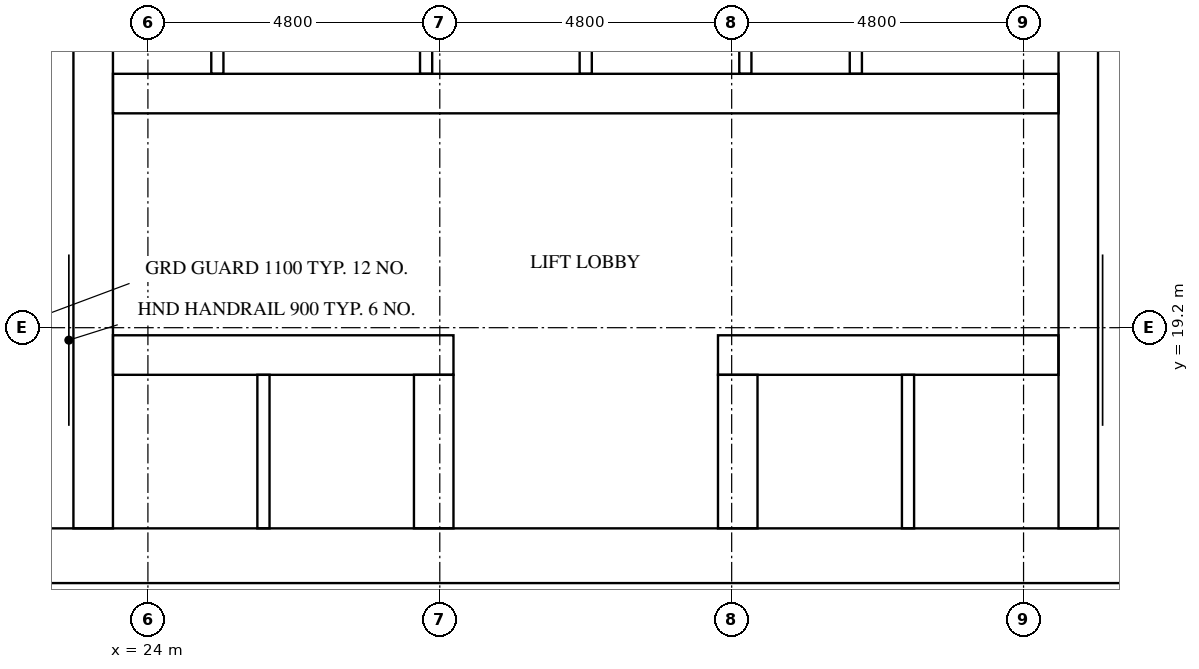
"""IFC4 building model, lengths in metres.
Left out: names, types, materials, properties, quantities, classifications, styles, units other than length and angle.
Written with IfcOpenShell. Run it as: python <this file> out.ifc"""

import sys

from ifc_helpers import new_model, si_unit, direction, frame, frame_2d, origin, place, context, subcontext, project, spatial, rectangle, extrude, element, fill, save


model = new_model("IFC4")
c1 = context("Model", 3, precision=1e-05, world=origin(), true_north=direction((0.0, 1.0)))
c2 = subcontext(c1, "Body", "Model", "MODEL_VIEW")
j1 = project(units=[si_unit("LENGTHUNIT", "METRE"), si_unit("PLANEANGLEUNIT", "RADIAN")], contexts=[c1])
p1 = place(None, origin())
s1 = spatial("IfcSite", under=j1, at=p1, CompositionType="ELEMENT")
p2 = place(p1, origin())
s2 = spatial("IfcBuilding", under=s1, at=p2, CompositionType="ELEMENT")
p3 = place(p2, frame((0.0, 0.0, 89.2)))
s3 = spatial("IfcBuildingStorey", under=s2, at=p3, CompositionType="ELEMENT", Elevation=89.2)
p4 = place(p3, frame((15.0, 15.45, 0.0), z_axis=(0.0, 0.0, 1.0), x_axis=(1.0, 0.0, 0.0)))
e1 = element("IfcWall", 1, at=p4, inside=s3, PredefinedType="SHEAR", context=c2, shape_type="SweptSolid", body=[
    extrude(rectangle(XDim=32.4, YDim=0.9, at=frame_2d((16.2, 0.0))), origin(), (0.0, 0.0, 1.0), 3.2),
])
p5 = place(p4, frame((15.3, 0.0, 0.0)))
e2 = element("IfcOpeningElement", 2, at=p5, cuts=e1, PredefinedType="OPENING", context=c2, shape_type="SweptSolid", body=[
    extrude(rectangle(XDim=1.8, YDim=2.1, at=frame_2d((0.9, 1.05))), frame((0.0, 0.46, 0.0), z_axis=(0.0, -1.0, 0.0), x_axis=(1.0, 0.0, 0.0)), (0.0, 0.0, 1.0), 0.92),
])
p6 = place(p3, frame((23.1, 15.9, 0.0), z_axis=(0.0, 0.0, 1.0), x_axis=(0.0, 1.0, 0.0)))
e3 = element("IfcWall", 3, at=p6, inside=s3, PredefinedType="SHEAR", context=c2, shape_type="SweptSolid", body=[
    extrude(rectangle(XDim=21.0, YDim=0.65, at=frame_2d((10.5, 0.0))), origin(), (0.0, 0.0, 1.0), 3.2),
])
p7 = place(p3, frame((39.3, 15.9, 0.0), z_axis=(0.0, 0.0, 1.0), x_axis=(0.0, 1.0, 0.0)))
e4 = element("IfcWall", 4, at=p7, inside=s3, PredefinedType="SHEAR", context=c2, shape_type="SweptSolid", body=[
    extrude(rectangle(XDim=8.35, YDim=0.65, at=frame_2d((4.175, 0.0))), origin(), (0.0, 0.0, 1.0), 3.2),
])
p8 = place(p3, frame((23.425, 18.75, 0.0), z_axis=(0.0, 0.0, 1.0), x_axis=(1.0, 0.0, 0.0)))
e5 = element("IfcWall", 5, at=p8, inside=s3, PredefinedType="SHEAR", context=c2, shape_type="SweptSolid", body=[
    extrude(rectangle(XDim=5.6, YDim=0.65, at=frame_2d((2.8, 0.0))), origin(), (0.0, 0.0, 1.0), 3.2),
])
p9 = place(p8, frame((0.637, 0.0, 0.0)))
e6 = element("IfcOpeningElement", 6, at=p9, cuts=e5, PredefinedType="OPENING", context=c2, shape_type="SweptSolid", body=[
    extrude(rectangle(XDim=1.1, YDim=2.1, at=frame_2d((0.55, 1.05))), frame((0.0, 0.335, 0.0), z_axis=(0.0, -1.0, 0.0), x_axis=(1.0, 0.0, 0.0)), (0.0, 0.0, 1.0), 0.67),
])
p10 = place(p8, frame((3.212, 0.0, 0.0)))
e7 = element("IfcOpeningElement", 7, at=p10, cuts=e5, PredefinedType="OPENING", context=c2, shape_type="SweptSolid", body=[
    extrude(rectangle(XDim=1.1, YDim=2.1, at=frame_2d((0.55, 1.05))), frame((0.0, 0.335, 0.0), z_axis=(0.0, -1.0, 0.0), x_axis=(1.0, 0.0, 0.0)), (0.0, 0.0, 1.0), 0.67),
])
p11 = place(p3, frame((33.375, 18.75, 0.0), z_axis=(0.0, 0.0, 1.0), x_axis=(1.0, 0.0, 0.0)))
e8 = element("IfcWall", 8, at=p11, inside=s3, PredefinedType="SHEAR", context=c2, shape_type="SweptSolid", body=[
    extrude(rectangle(XDim=5.6, YDim=0.65, at=frame_2d((2.8, 0.0))), origin(), (0.0, 0.0, 1.0), 3.2),
])
p12 = place(p11, frame((1.288, 0.0, 0.0)))
e9 = element("IfcOpeningElement", 9, at=p12, cuts=e8, PredefinedType="OPENING", context=c2, shape_type="SweptSolid", body=[
    extrude(rectangle(XDim=1.1, YDim=2.1, at=frame_2d((0.55, 1.05))), frame((0.0, 0.335, 0.0), z_axis=(0.0, -1.0, 0.0), x_axis=(1.0, 0.0, 0.0)), (0.0, 0.0, 1.0), 0.67),
])
p13 = place(p11, frame((3.863, 0.0, 0.0)))
e10 = element("IfcOpeningElement", 10, at=p13, cuts=e8, PredefinedType="OPENING", context=c2, shape_type="SweptSolid", body=[
    extrude(rectangle(XDim=1.1, YDim=2.1, at=frame_2d((0.55, 1.05))), frame((0.0, 0.335, 0.0), z_axis=(0.0, -1.0, 0.0), x_axis=(1.0, 0.0, 0.0)), (0.0, 0.0, 1.0), 0.67),
])
p14 = place(p3, frame((23.425, 23.05, 0.0), z_axis=(0.0, 0.0, 1.0), x_axis=(1.0, 0.0, 0.0)))
e11 = element("IfcWall", 11, at=p14, inside=s3, PredefinedType="SHEAR", context=c2, shape_type="SweptSolid", body=[
    extrude(rectangle(XDim=15.55, YDim=0.65, at=frame_2d((7.775, 0.0))), origin(), (0.0, 0.0, 1.0), 3.2),
])
p15 = place(p14, frame((0.309, 0.0, 0.0)))
e12 = element("IfcOpeningElement", 12, at=p15, cuts=e11, PredefinedType="OPENING", context=c2, shape_type="SweptSolid", body=[
    extrude(rectangle(XDim=1.0, YDim=2.1, at=frame_2d((0.5, 1.05))), frame((0.0, 0.335, 0.0), z_axis=(0.0, -1.0, 0.0), x_axis=(1.0, 0.0, 0.0)), (0.0, 0.0, 1.0), 0.67),
])
p16 = place(p14, frame((2.934, 0.0, 0.0)))
e13 = element("IfcOpeningElement", 13, at=p16, cuts=e11, PredefinedType="OPENING", context=c2, shape_type="SweptSolid", body=[
    extrude(rectangle(XDim=1.0, YDim=2.1, at=frame_2d((0.5, 1.05))), frame((0.0, 0.335, 0.0), z_axis=(0.0, -1.0, 0.0), x_axis=(1.0, 0.0, 0.0)), (0.0, 0.0, 1.0), 0.67),
])
p17 = place(p14, frame((10.809, 0.0, 0.0)))
e14 = element("IfcOpeningElement", 14, at=p17, cuts=e11, PredefinedType="OPENING", context=c2, shape_type="SweptSolid", body=[
    extrude(rectangle(XDim=1.0, YDim=2.1, at=frame_2d((0.5, 1.05))), frame((0.0, 0.335, 0.0), z_axis=(0.0, -1.0, 0.0), x_axis=(1.0, 0.0, 0.0)), (0.0, 0.0, 1.0), 0.67),
])
p18 = place(p14, frame((13.434, 0.0, 0.0)))
e15 = element("IfcOpeningElement", 15, at=p18, cuts=e11, PredefinedType="OPENING", context=c2, shape_type="SweptSolid", body=[
    extrude(rectangle(XDim=1.0, YDim=2.1, at=frame_2d((0.5, 1.05))), frame((0.0, 0.335, 0.0), z_axis=(0.0, -1.0, 0.0), x_axis=(1.0, 0.0, 0.0)), (0.0, 0.0, 1.0), 0.67),
])
for number, where, z_axis, x_axis in (
    (16, (28.7, 15.9, 0.0), (0.0, 0.0, 1.0), (0.0, 1.0, 0.0)),
    (17, (33.7, 15.9, 0.0), (0.0, 0.0, 1.0), (0.0, 1.0, 0.0)),
):
    element("IfcWall", number, at=place(p3, frame(where, z_axis=z_axis, x_axis=x_axis)), inside=s3, PredefinedType="SHEAR", context=c2, shape_type="SweptSolid", body=[
        extrude(rectangle(XDim=2.525, YDim=0.65, at=frame_2d((1.263, 0.0))), origin(), (0.0, 0.0, 1.0), 3.2),
    ])
for number, where, z_axis, x_axis in (
    (18, (28.575, 23.375, 0.0), (0.0, 0.0, 1.0), (0.0, 1.0, 0.0)),
    (19, (31.2, 23.375, 0.0), (0.0, 0.0, 1.0), (0.0, 1.0, 0.0)),
    (20, (33.825, 23.375, 0.0), (0.0, 0.0, 1.0), (0.0, 1.0, 0.0)),
):
    element("IfcWall", number, at=place(p3, frame(where, z_axis=z_axis, x_axis=x_axis)), inside=s3, PredefinedType="SOLIDWALL", context=c2, shape_type="SweptSolid", body=[
        extrude(rectangle(XDim=2.45, YDim=0.2, at=frame_2d((1.225, 0.0))), origin(), (0.0, 0.0, 1.0), 3.2),
    ])
for number, where, z_axis, x_axis in (
    (21, (25.9, 15.9, 0.0), (0.0, 0.0, 1.0), (0.0, 1.0, 0.0)),
    (22, (36.5, 15.9, 0.0), (0.0, 0.0, 1.0), (0.0, 1.0, 0.0)),
):
    element("IfcWall", number, at=place(p3, frame(where, z_axis=z_axis, x_axis=x_axis)), inside=s3, PredefinedType="SOLIDWALL", context=c2, shape_type="SweptSolid", body=[
        extrude(rectangle(XDim=2.525, YDim=0.2, at=frame_2d((1.263, 0.0))), origin(), (0.0, 0.0, 1.0), 3.2),
    ])
for number, where, z_axis, x_axis in (
    (23, (25.142, 23.375, 0.0), (0.0, 0.0, 1.0), (0.0, 1.0, 0.0)),
    (24, (35.642, 23.375, 0.0), (0.0, 0.0, 1.0), (0.0, 1.0, 0.0)),
):
    element("IfcWall", number, at=place(p3, frame(where, z_axis=z_axis, x_axis=x_axis)), inside=s3, PredefinedType="PARTITIONING", context=c2, shape_type="SweptSolid", body=[
        extrude(rectangle(XDim=2.45, YDim=0.2, at=frame_2d((1.225, 0.0))), origin(), (0.0, 0.0, 1.0), 3.2),
    ])
p19 = place(p9, origin())
e25 = element("IfcDoor", 25, at=p19, inside=s3, OperationType="DOUBLE_DOOR_SLIDING", PredefinedType="DOOR", context=c2, shape_type="SweptSolid", body=[
    extrude(rectangle(XDim=1.1, YDim=2.1, at=frame_2d((0.55, 1.05))), frame((0.0, 0.025, 0.0), z_axis=(0.0, -1.0, 0.0), x_axis=(1.0, 0.0, 0.0)), (0.0, 0.0, 1.0), 0.05),
])
fill(e6, e25)
p20 = place(p10, origin())
e26 = element("IfcDoor", 26, at=p20, inside=s3, OperationType="DOUBLE_DOOR_SLIDING", PredefinedType="DOOR", context=c2, shape_type="SweptSolid", body=[
    extrude(rectangle(XDim=1.1, YDim=2.1, at=frame_2d((0.55, 1.05))), frame((0.0, 0.025, 0.0), z_axis=(0.0, -1.0, 0.0), x_axis=(1.0, 0.0, 0.0)), (0.0, 0.0, 1.0), 0.05),
])
fill(e7, e26)
p21 = place(p12, origin())
e27 = element("IfcDoor", 27, at=p21, inside=s3, OperationType="DOUBLE_DOOR_SLIDING", PredefinedType="DOOR", context=c2, shape_type="SweptSolid", body=[
    extrude(rectangle(XDim=1.1, YDim=2.1, at=frame_2d((0.55, 1.05))), frame((0.0, 0.025, 0.0), z_axis=(0.0, -1.0, 0.0), x_axis=(1.0, 0.0, 0.0)), (0.0, 0.0, 1.0), 0.05),
])
fill(e9, e27)
p22 = place(p13, origin())
e28 = element("IfcDoor", 28, at=p22, inside=s3, OperationType="DOUBLE_DOOR_SLIDING", PredefinedType="DOOR", context=c2, shape_type="SweptSolid", body=[
    extrude(rectangle(XDim=1.1, YDim=2.1, at=frame_2d((0.55, 1.05))), frame((0.0, 0.025, 0.0), z_axis=(0.0, -1.0, 0.0), x_axis=(1.0, 0.0, 0.0)), (0.0, 0.0, 1.0), 0.05),
])
fill(e10, e28)
p23 = place(p5, frame((1.8, 0.0, 0.0), z_axis=(0.0, 0.0, 1.0), x_axis=(-1.0, 0.0, 0.0)))
e29 = element("IfcDoor", 29, at=p23, inside=s3, OperationType="DOUBLE_DOOR_SINGLE_SWING", PredefinedType="DOOR", context=c2, shape_type="SweptSolid", body=[
    extrude(rectangle(XDim=1.8, YDim=2.1, at=frame_2d((0.9, 1.05))), frame((0.0, 0.025, 0.0), z_axis=(0.0, -1.0, 0.0), x_axis=(1.0, 0.0, 0.0)), (0.0, 0.0, 1.0), 0.05),
])
fill(e2, e29)
p24 = place(p15, frame((1.0, 0.0, 0.0), z_axis=(0.0, 0.0, 1.0), x_axis=(-1.0, 0.0, 0.0)))
e30 = element("IfcDoor", 30, at=p24, inside=s3, OperationType="SINGLE_SWING_LEFT", PredefinedType="DOOR", context=c2, shape_type="SweptSolid", body=[
    extrude(rectangle(XDim=1.0, YDim=2.1, at=frame_2d((0.5, 1.05))), frame((0.0, 0.025, 0.0), z_axis=(0.0, -1.0, 0.0), x_axis=(1.0, 0.0, 0.0)), (0.0, 0.0, 1.0), 0.05),
])
fill(e12, e30)
p25 = place(p16, frame((1.0, 0.0, 0.0), z_axis=(0.0, 0.0, 1.0), x_axis=(-1.0, 0.0, 0.0)))
e31 = element("IfcDoor", 31, at=p25, inside=s3, OperationType="SINGLE_SWING_RIGHT", PredefinedType="DOOR", context=c2, shape_type="SweptSolid", body=[
    extrude(rectangle(XDim=1.0, YDim=2.1, at=frame_2d((0.5, 1.05))), frame((0.0, 0.025, 0.0), z_axis=(0.0, -1.0, 0.0), x_axis=(1.0, 0.0, 0.0)), (0.0, 0.0, 1.0), 0.05),
])
fill(e13, e31)
p26 = place(p17, frame((1.0, 0.0, 0.0), z_axis=(0.0, 0.0, 1.0), x_axis=(-1.0, 0.0, 0.0)))
e32 = element("IfcDoor", 32, at=p26, inside=s3, OperationType="SINGLE_SWING_LEFT", PredefinedType="DOOR", context=c2, shape_type="SweptSolid", body=[
    extrude(rectangle(XDim=1.0, YDim=2.1, at=frame_2d((0.5, 1.05))), frame((0.0, 0.025, 0.0), z_axis=(0.0, -1.0, 0.0), x_axis=(1.0, 0.0, 0.0)), (0.0, 0.0, 1.0), 0.05),
])
fill(e14, e32)
p27 = place(p18, frame((1.0, 0.0, 0.0), z_axis=(0.0, 0.0, 1.0), x_axis=(-1.0, 0.0, 0.0)))
e33 = element("IfcDoor", 33, at=p27, inside=s3, OperationType="SINGLE_SWING_RIGHT", PredefinedType="DOOR", context=c2, shape_type="SweptSolid", body=[
    extrude(rectangle(XDim=1.0, YDim=2.1, at=frame_2d((0.5, 1.05))), frame((0.0, 0.025, 0.0), z_axis=(0.0, -1.0, 0.0), x_axis=(1.0, 0.0, 0.0)), (0.0, 0.0, 1.0), 0.05),
])
fill(e15, e33)
save(model, sys.argv[1])
